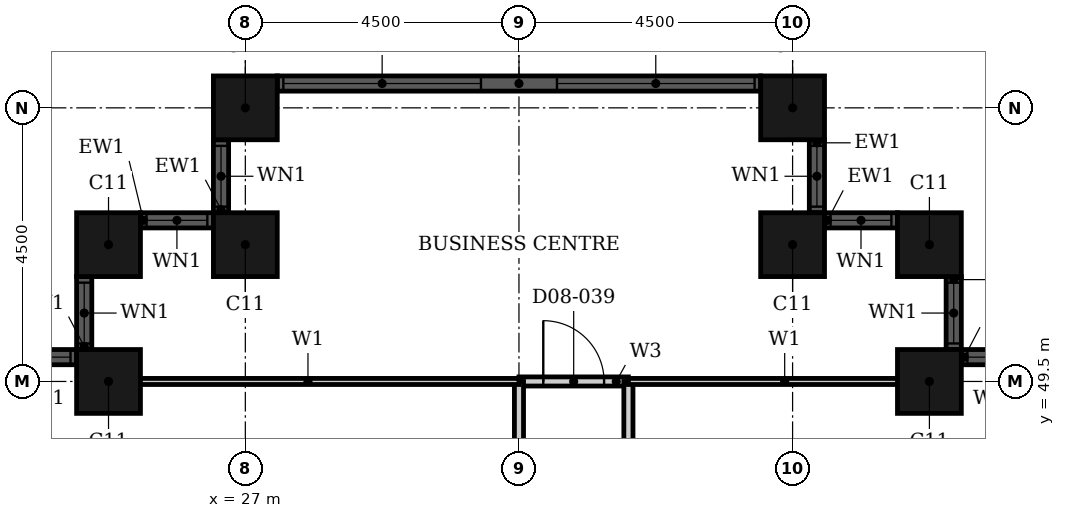
"""IFC4 building model, lengths in metres.
Left out: names, types, materials, properties, quantities, classifications, styles, units other than length and angle.
Written with IfcOpenShell. Run it as: python <this file> out.ifc"""

import sys

from ifc_helpers import new_model, si_unit, direction, frame, frame_2d, origin, origin_2d, place, context, subcontext, project, spatial, rectangle, hollow_rectangle, extrude, element, fill, save


model = new_model("IFC4")
c1 = context("Model", 3, precision=1e-05, world=origin(), true_north=direction((0.0, 1.0)))
c2 = subcontext(c1, "Body", "Model", "MODEL_VIEW")
j1 = project(units=[si_unit("LENGTHUNIT", "METRE"), si_unit("PLANEANGLEUNIT", "RADIAN")], contexts=[c1])
p1 = place(None, origin())
s1 = spatial("IfcSite", under=j1, at=p1, CompositionType="ELEMENT")
p2 = place(p1, origin())
s2 = spatial("IfcBuilding", under=s1, at=p2, CompositionType="ELEMENT")
p3 = place(p2, frame((0.0, 0.0, 40.8)))
s3 = spatial("IfcBuildingStorey", under=s2, at=p3, CompositionType="ELEMENT", Elevation=40.8)
for number, where, z_axis, x_axis in (
    (1, (38.25, 49.5, 0.0), (0.0, 0.0, 1.0), (1.0, 0.0, 0.0)),
    (2, (38.25, 51.75, 0.0), (0.0, 0.0, 1.0), (1.0, 0.0, 0.0)),
    (3, (36.0, 51.75, 0.0), (0.0, 0.0, 1.0), (1.0, 0.0, 0.0)),
    (4, (36.0, 54.0, 0.0), (0.0, 0.0, 1.0), (1.0, 0.0, 0.0)),
    (5, (27.0, 54.0, 0.0), (0.0, 0.0, 1.0), (1.0, 0.0, 0.0)),
    (6, (27.0, 51.75, 0.0), (0.0, 0.0, 1.0), (1.0, 0.0, 0.0)),
    (7, (24.75, 51.75, 0.0), (0.0, 0.0, 1.0), (1.0, 0.0, 0.0)),
    (8, (24.75, 49.5, 0.0), (0.0, 0.0, 1.0), (1.0, 0.0, 0.0)),
):
    element("IfcColumn", number, at=place(p3, frame(where, z_axis=z_axis, x_axis=x_axis)), inside=s3, PredefinedType="COLUMN", context=c2, shape_type="SweptSolid", body=[
        extrude(hollow_rectangle(XDim=1.05, YDim=1.05, WallThickness=0.034, at=origin_2d()), origin(), (0.0, 0.0, 1.0), 3.6),
    ])
p4 = place(p3, frame((39.975, 49.9, 0.0), z_axis=(0.0, 0.0, 1.0), x_axis=(-1.0, 0.0, 0.0)))
e9 = element("IfcWall", 9, at=p4, inside=s3, PredefinedType="SOLIDWALL", context=c2, shape_type="SweptSolid", body=[
    extrude(rectangle(XDim=1.2, YDim=0.25, at=frame_2d((0.6, 0.0))), origin(), (0.0, 0.0, 1.0), 3.6),
])
p5 = place(p4, frame((0.1, 0.0, 0.9)))
e10 = element("IfcOpeningElement", 10, at=p5, cuts=e9, PredefinedType="OPENING", context=c2, shape_type="SweptSolid", body=[
    extrude(rectangle(XDim=1.0, YDim=2.08, at=frame_2d((0.5, 1.04))), frame((0.0, 0.135, 0.0), z_axis=(0.0, -1.0, 0.0), x_axis=(1.0, 0.0, 0.0)), (0.0, 0.0, 1.0), 0.27),
])
p6 = place(p3, frame((38.65, 50.025, 0.0), z_axis=(0.0, 0.0, 1.0), x_axis=(0.0, 1.0, 0.0)))
e11 = element("IfcWall", 11, at=p6, inside=s3, PredefinedType="SOLIDWALL", context=c2, shape_type="SweptSolid", body=[
    extrude(rectangle(XDim=1.2, YDim=0.25, at=frame_2d((0.6, 0.0))), origin(), (0.0, 0.0, 1.0), 3.6),
])
p7 = place(p6, frame((0.1, 0.0, 0.9)))
e12 = element("IfcOpeningElement", 12, at=p7, cuts=e11, PredefinedType="OPENING", context=c2, shape_type="SweptSolid", body=[
    extrude(rectangle(XDim=1.0, YDim=2.08, at=frame_2d((0.5, 1.04))), frame((0.0, 0.135, 0.0), z_axis=(0.0, -1.0, 0.0), x_axis=(1.0, 0.0, 0.0)), (0.0, 0.0, 1.0), 0.27),
])
p8 = place(p3, frame((37.725, 52.15, 0.0), z_axis=(0.0, 0.0, 1.0), x_axis=(-1.0, 0.0, 0.0)))
e13 = element("IfcWall", 13, at=p8, inside=s3, PredefinedType="SOLIDWALL", context=c2, shape_type="SweptSolid", body=[
    extrude(rectangle(XDim=1.2, YDim=0.25, at=frame_2d((0.6, 0.0))), origin(), (0.0, 0.0, 1.0), 3.6),
])
p9 = place(p8, frame((0.1, 0.0, 0.9)))
e14 = element("IfcOpeningElement", 14, at=p9, cuts=e13, PredefinedType="OPENING", context=c2, shape_type="SweptSolid", body=[
    extrude(rectangle(XDim=1.0, YDim=2.08, at=frame_2d((0.5, 1.04))), frame((0.0, 0.135, 0.0), z_axis=(0.0, -1.0, 0.0), x_axis=(1.0, 0.0, 0.0)), (0.0, 0.0, 1.0), 0.27),
])
p10 = place(p3, frame((36.4, 52.275, 0.0), z_axis=(0.0, 0.0, 1.0), x_axis=(0.0, 1.0, 0.0)))
e15 = element("IfcWall", 15, at=p10, inside=s3, PredefinedType="SOLIDWALL", context=c2, shape_type="SweptSolid", body=[
    extrude(rectangle(XDim=1.2, YDim=0.25, at=frame_2d((0.6, 0.0))), origin(), (0.0, 0.0, 1.0), 3.6),
])
p11 = place(p10, frame((0.1, 0.0, 0.9)))
e16 = element("IfcOpeningElement", 16, at=p11, cuts=e15, PredefinedType="OPENING", context=c2, shape_type="SweptSolid", body=[
    extrude(rectangle(XDim=1.0, YDim=2.08, at=frame_2d((0.5, 1.04))), frame((0.0, 0.135, 0.0), z_axis=(0.0, -1.0, 0.0), x_axis=(1.0, 0.0, 0.0)), (0.0, 0.0, 1.0), 0.27),
])
p12 = place(p3, frame((35.475, 54.4, 0.0), z_axis=(0.0, 0.0, 1.0), x_axis=(-1.0, 0.0, 0.0)))
e17 = element("IfcWall", 17, at=p12, inside=s3, PredefinedType="SOLIDWALL", context=c2, shape_type="SweptSolid", body=[
    extrude(rectangle(XDim=7.95, YDim=0.25, at=frame_2d((3.975, 0.0))), origin(), (0.0, 0.0, 1.0), 3.6),
])
p13 = place(p12, frame((0.1, 0.0, 0.9)))
e18 = element("IfcOpeningElement", 18, at=p13, cuts=e17, PredefinedType="OPENING", context=c2, shape_type="SweptSolid", body=[
    extrude(rectangle(XDim=3.25, YDim=2.08, at=frame_2d((1.625, 1.04))), frame((0.0, 0.135, 0.0), z_axis=(0.0, -1.0, 0.0), x_axis=(1.0, 0.0, 0.0)), (0.0, 0.0, 1.0), 0.27),
])
p14 = place(p12, frame((4.6, 0.0, 0.9)))
e19 = element("IfcOpeningElement", 19, at=p14, cuts=e17, PredefinedType="OPENING", context=c2, shape_type="SweptSolid", body=[
    extrude(rectangle(XDim=3.25, YDim=2.08, at=frame_2d((1.625, 1.04))), frame((0.0, 0.135, 0.0), z_axis=(0.0, -1.0, 0.0), x_axis=(1.0, 0.0, 0.0)), (0.0, 0.0, 1.0), 0.27),
])
p15 = place(p3, frame((26.6, 53.475, 0.0), z_axis=(0.0, 0.0, 1.0), x_axis=(0.0, -1.0, 0.0)))
e20 = element("IfcWall", 20, at=p15, inside=s3, PredefinedType="SOLIDWALL", context=c2, shape_type="SweptSolid", body=[
    extrude(rectangle(XDim=1.2, YDim=0.25, at=frame_2d((0.6, 0.0))), origin(), (0.0, 0.0, 1.0), 3.6),
])
p16 = place(p15, frame((0.1, 0.0, 0.9)))
e21 = element("IfcOpeningElement", 21, at=p16, cuts=e20, PredefinedType="OPENING", context=c2, shape_type="SweptSolid", body=[
    extrude(rectangle(XDim=1.0, YDim=2.08, at=frame_2d((0.5, 1.04))), frame((0.0, 0.135, 0.0), z_axis=(0.0, -1.0, 0.0), x_axis=(1.0, 0.0, 0.0)), (0.0, 0.0, 1.0), 0.27),
])
p17 = place(p3, frame((26.475, 52.15, 0.0), z_axis=(0.0, 0.0, 1.0), x_axis=(-1.0, 0.0, 0.0)))
e22 = element("IfcWall", 22, at=p17, inside=s3, PredefinedType="SOLIDWALL", context=c2, shape_type="SweptSolid", body=[
    extrude(rectangle(XDim=1.2, YDim=0.25, at=frame_2d((0.6, 0.0))), origin(), (0.0, 0.0, 1.0), 3.6),
])
p18 = place(p17, frame((0.1, 0.0, 0.9)))
e23 = element("IfcOpeningElement", 23, at=p18, cuts=e22, PredefinedType="OPENING", context=c2, shape_type="SweptSolid", body=[
    extrude(rectangle(XDim=1.0, YDim=2.08, at=frame_2d((0.5, 1.04))), frame((0.0, 0.135, 0.0), z_axis=(0.0, -1.0, 0.0), x_axis=(1.0, 0.0, 0.0)), (0.0, 0.0, 1.0), 0.27),
])
p19 = place(p3, frame((24.35, 51.225, 0.0), z_axis=(0.0, 0.0, 1.0), x_axis=(0.0, -1.0, 0.0)))
e24 = element("IfcWall", 24, at=p19, inside=s3, PredefinedType="SOLIDWALL", context=c2, shape_type="SweptSolid", body=[
    extrude(rectangle(XDim=1.2, YDim=0.25, at=frame_2d((0.6, 0.0))), origin(), (0.0, 0.0, 1.0), 3.6),
])
p20 = place(p19, frame((0.1, 0.0, 0.9)))
e25 = element("IfcOpeningElement", 25, at=p20, cuts=e24, PredefinedType="OPENING", context=c2, shape_type="SweptSolid", body=[
    extrude(rectangle(XDim=1.0, YDim=2.08, at=frame_2d((0.5, 1.04))), frame((0.0, 0.135, 0.0), z_axis=(0.0, -1.0, 0.0), x_axis=(1.0, 0.0, 0.0)), (0.0, 0.0, 1.0), 0.27),
])
p21 = place(p3, frame((24.225, 49.9, 0.0), z_axis=(0.0, 0.0, 1.0), x_axis=(-1.0, 0.0, 0.0)))
e26 = element("IfcWall", 26, at=p21, inside=s3, PredefinedType="SOLIDWALL", context=c2, shape_type="SweptSolid", body=[
    extrude(rectangle(XDim=1.2, YDim=0.25, at=frame_2d((0.6, 0.0))), origin(), (0.0, 0.0, 1.0), 3.6),
])
p22 = place(p21, frame((0.1, 0.0, 0.9)))
e27 = element("IfcOpeningElement", 27, at=p22, cuts=e26, PredefinedType="OPENING", context=c2, shape_type="SweptSolid", body=[
    extrude(rectangle(XDim=1.0, YDim=2.08, at=frame_2d((0.5, 1.04))), frame((0.0, 0.135, 0.0), z_axis=(0.0, -1.0, 0.0), x_axis=(1.0, 0.0, 0.0)), (0.0, 0.0, 1.0), 0.27),
])
p23 = place(p3, frame((31.5, 49.5, 0.0), z_axis=(0.0, 0.0, 1.0), x_axis=(1.0, 0.0, 0.0)))
e28 = element("IfcWall", 28, at=p23, inside=s3, PredefinedType="PARTITIONING", context=c2, shape_type="SweptSolid", body=[
    extrude(rectangle(XDim=1.8, YDim=0.15, at=frame_2d((0.9, 0.0))), origin(), (0.0, 0.0, 1.0), 3.3),
])
p24 = place(p23, frame((0.4, 0.0, 0.0)))
e29 = element("IfcOpeningElement", 29, at=p24, cuts=e28, PredefinedType="OPENING", context=c2, shape_type="SweptSolid", body=[
    extrude(rectangle(XDim=1.0, YDim=2.1, at=frame_2d((0.5, 1.05))), frame((0.0, 0.085, 0.0), z_axis=(0.0, -1.0, 0.0), x_axis=(1.0, 0.0, 0.0)), (0.0, 0.0, 1.0), 0.17),
])
p25 = place(p3, frame((31.5, 33.3, 0.0), z_axis=(0.0, 0.0, 1.0), x_axis=(0.0, 1.0, 0.0)))
e30 = element("IfcWall", 30, at=p25, inside=s3, PredefinedType="PARTITIONING", context=c2, shape_type="SweptSolid", body=[
    extrude(rectangle(XDim=16.2, YDim=0.15, at=frame_2d((8.1, 0.0))), origin(), (0.0, 0.0, 1.0), 2.58),
])
p26 = place(p25, frame((8.95, 0.0, 0.0)))
e31 = element("IfcOpeningElement", 31, at=p26, cuts=e30, PredefinedType="OPENING", context=c2, shape_type="SweptSolid", body=[
    extrude(rectangle(XDim=1.0, YDim=2.1, at=frame_2d((0.5, 1.05))), frame((0.0, 0.085, 0.0), z_axis=(0.0, -1.0, 0.0), x_axis=(1.0, 0.0, 0.0)), (0.0, 0.0, 1.0), 0.17),
])
p27 = place(p3, frame((33.3, 33.3, 0.0), z_axis=(0.0, 0.0, 1.0), x_axis=(0.0, 1.0, 0.0)))
e32 = element("IfcWall", 32, at=p27, inside=s3, PredefinedType="PARTITIONING", context=c2, shape_type="SweptSolid", body=[
    extrude(rectangle(XDim=16.2, YDim=0.15, at=frame_2d((8.1, 0.0))), origin(), (0.0, 0.0, 1.0), 3.3),
])
p28 = place(p27, frame((8.95, 0.0, 0.0)))
e33 = element("IfcOpeningElement", 33, at=p28, cuts=e32, PredefinedType="OPENING", context=c2, shape_type="SweptSolid", body=[
    extrude(rectangle(XDim=1.0, YDim=2.1, at=frame_2d((0.5, 1.05))), frame((0.0, 0.085, 0.0), z_axis=(0.0, -1.0, 0.0), x_axis=(1.0, 0.0, 0.0)), (0.0, 0.0, 1.0), 0.17),
])
p29 = place(p3, frame((33.3, 49.5, 0.0), z_axis=(0.0, 0.0, 1.0), x_axis=(1.0, 0.0, 0.0)))
e34 = element("IfcWall", 34, at=p29, inside=s3, PredefinedType="PARTITIONING", context=c2, shape_type="SweptSolid", body=[
    extrude(rectangle(XDim=5.14, YDim=0.1, at=frame_2d((2.57, 0.0))), origin(), (0.0, 0.0, 1.0), 3.3),
])
p30 = place(p3, frame((24.56, 49.5, 0.0), z_axis=(0.0, 0.0, 1.0), x_axis=(1.0, 0.0, 0.0)))
e35 = element("IfcWall", 35, at=p30, inside=s3, PredefinedType="PARTITIONING", context=c2, shape_type="SweptSolid", body=[
    extrude(rectangle(XDim=6.94, YDim=0.1, at=frame_2d((3.47, 0.0))), origin(), (0.0, 0.0, 1.0), 3.3),
])
p31 = place(p5, origin())
e36 = element("IfcWindow", 36, at=p31, inside=s3, PartitioningType="SINGLE_PANEL", PredefinedType="WINDOW", context=c2, shape_type="SweptSolid", body=[
    extrude(rectangle(XDim=1.0, YDim=2.08, at=frame_2d((0.5, 1.04))), frame((0.0, 0.03, 0.0), z_axis=(0.0, -1.0, 0.0), x_axis=(1.0, 0.0, 0.0)), (0.0, 0.0, 1.0), 0.06),
])
fill(e10, e36)
p32 = place(p7, origin())
e37 = element("IfcWindow", 37, at=p32, inside=s3, PartitioningType="SINGLE_PANEL", PredefinedType="WINDOW", context=c2, shape_type="SweptSolid", body=[
    extrude(rectangle(XDim=1.0, YDim=2.08, at=frame_2d((0.5, 1.04))), frame((0.0, 0.03, 0.0), z_axis=(0.0, -1.0, 0.0), x_axis=(1.0, 0.0, 0.0)), (0.0, 0.0, 1.0), 0.06),
])
fill(e12, e37)
p33 = place(p9, origin())
e38 = element("IfcWindow", 38, at=p33, inside=s3, PartitioningType="SINGLE_PANEL", PredefinedType="WINDOW", context=c2, shape_type="SweptSolid", body=[
    extrude(rectangle(XDim=1.0, YDim=2.08, at=frame_2d((0.5, 1.04))), frame((0.0, 0.03, 0.0), z_axis=(0.0, -1.0, 0.0), x_axis=(1.0, 0.0, 0.0)), (0.0, 0.0, 1.0), 0.06),
])
fill(e14, e38)
p34 = place(p11, origin())
e39 = element("IfcWindow", 39, at=p34, inside=s3, PartitioningType="SINGLE_PANEL", PredefinedType="WINDOW", context=c2, shape_type="SweptSolid", body=[
    extrude(rectangle(XDim=1.0, YDim=2.08, at=frame_2d((0.5, 1.04))), frame((0.0, 0.03, 0.0), z_axis=(0.0, -1.0, 0.0), x_axis=(1.0, 0.0, 0.0)), (0.0, 0.0, 1.0), 0.06),
])
fill(e16, e39)
p35 = place(p13, origin())
e40 = element("IfcWindow", 40, at=p35, inside=s3, PartitioningType="SINGLE_PANEL", PredefinedType="WINDOW", context=c2, shape_type="SweptSolid", body=[
    extrude(rectangle(XDim=3.25, YDim=2.08, at=frame_2d((1.625, 1.04))), frame((0.0, 0.03, 0.0), z_axis=(0.0, -1.0, 0.0), x_axis=(1.0, 0.0, 0.0)), (0.0, 0.0, 1.0), 0.06),
])
fill(e18, e40)
p36 = place(p14, origin())
e41 = element("IfcWindow", 41, at=p36, inside=s3, PartitioningType="SINGLE_PANEL", PredefinedType="WINDOW", context=c2, shape_type="SweptSolid", body=[
    extrude(rectangle(XDim=3.25, YDim=2.08, at=frame_2d((1.625, 1.04))), frame((0.0, 0.03, 0.0), z_axis=(0.0, -1.0, 0.0), x_axis=(1.0, 0.0, 0.0)), (0.0, 0.0, 1.0), 0.06),
])
fill(e19, e41)
p37 = place(p16, origin())
e42 = element("IfcWindow", 42, at=p37, inside=s3, PartitioningType="SINGLE_PANEL", PredefinedType="WINDOW", context=c2, shape_type="SweptSolid", body=[
    extrude(rectangle(XDim=1.0, YDim=2.08, at=frame_2d((0.5, 1.04))), frame((0.0, 0.03, 0.0), z_axis=(0.0, -1.0, 0.0), x_axis=(1.0, 0.0, 0.0)), (0.0, 0.0, 1.0), 0.06),
])
fill(e21, e42)
p38 = place(p18, origin())
e43 = element("IfcWindow", 43, at=p38, inside=s3, PartitioningType="SINGLE_PANEL", PredefinedType="WINDOW", context=c2, shape_type="SweptSolid", body=[
    extrude(rectangle(XDim=1.0, YDim=2.08, at=frame_2d((0.5, 1.04))), frame((0.0, 0.03, 0.0), z_axis=(0.0, -1.0, 0.0), x_axis=(1.0, 0.0, 0.0)), (0.0, 0.0, 1.0), 0.06),
])
fill(e23, e43)
p39 = place(p20, origin())
e44 = element("IfcWindow", 44, at=p39, inside=s3, PartitioningType="SINGLE_PANEL", PredefinedType="WINDOW", context=c2, shape_type="SweptSolid", body=[
    extrude(rectangle(XDim=1.0, YDim=2.08, at=frame_2d((0.5, 1.04))), frame((0.0, 0.03, 0.0), z_axis=(0.0, -1.0, 0.0), x_axis=(1.0, 0.0, 0.0)), (0.0, 0.0, 1.0), 0.06),
])
fill(e25, e44)
p40 = place(p22, origin())
e45 = element("IfcWindow", 45, at=p40, inside=s3, PartitioningType="SINGLE_PANEL", PredefinedType="WINDOW", context=c2, shape_type="SweptSolid", body=[
    extrude(rectangle(XDim=1.0, YDim=2.08, at=frame_2d((0.5, 1.04))), frame((0.0, 0.03, 0.0), z_axis=(0.0, -1.0, 0.0), x_axis=(1.0, 0.0, 0.0)), (0.0, 0.0, 1.0), 0.06),
])
fill(e27, e45)
p41 = place(p24, origin())
e46 = element("IfcDoor", 46, at=p41, inside=s3, OperationType="SINGLE_SWING_LEFT", PredefinedType="DOOR", context=c2, shape_type="SweptSolid", body=[
    extrude(rectangle(XDim=1.0, YDim=2.1, at=frame_2d((0.5, 1.05))), frame((0.0, 0.025, 0.0), z_axis=(0.0, -1.0, 0.0), x_axis=(1.0, 0.0, 0.0)), (0.0, 0.0, 1.0), 0.05),
])
fill(e29, e46)
save(model, sys.argv[1])
